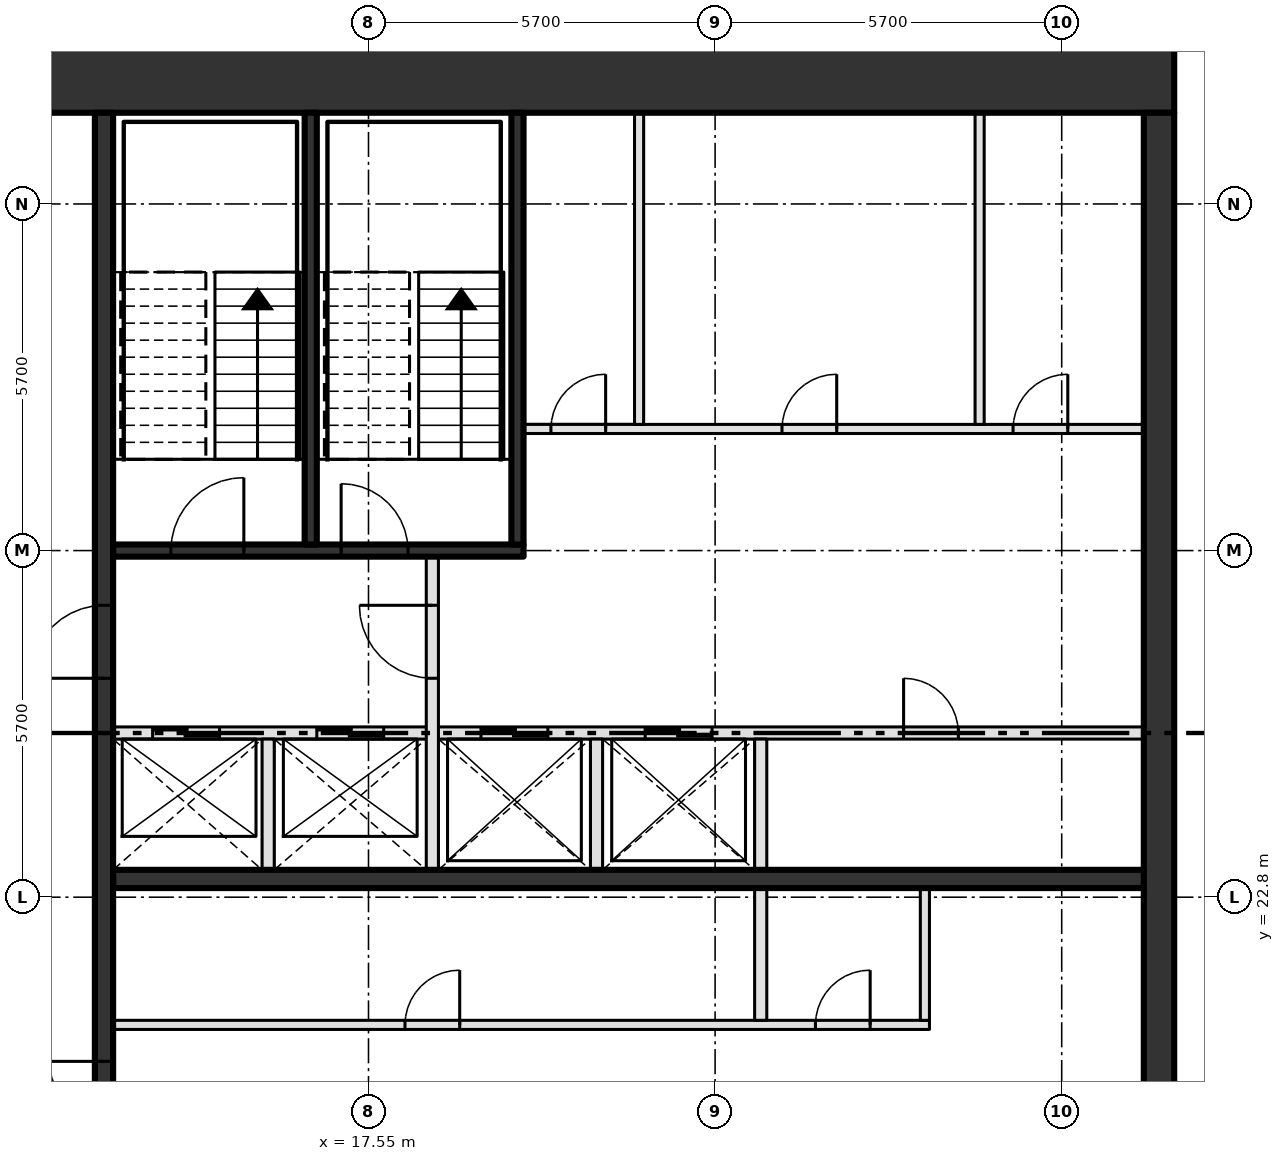
"""IFC4 building model, lengths in metres.
Left out: names, types, materials, properties, quantities, classifications, styles, units other than length and angle.
Written with IfcOpenShell. Run it as: python <this file> out.ifc"""

import sys

from ifc_helpers import new_model, si_unit, direction, frame, frame_2d, origin, place, context, subcontext, project, spatial, rectangle, extrude, element, fill, save


model = new_model("IFC4")
c1 = context("Model", 3, precision=1e-05, world=origin(), true_north=direction((0.0, 1.0)))
c2 = subcontext(c1, "Body", "Model", "MODEL_VIEW")
j1 = project(units=[si_unit("LENGTHUNIT", "METRE"), si_unit("PLANEANGLEUNIT", "RADIAN")], contexts=[c1])
p1 = place(None, origin())
s1 = spatial("IfcSite", under=j1, at=p1, CompositionType="ELEMENT")
p2 = place(p1, origin())
s2 = spatial("IfcBuilding", under=s1, at=p2, CompositionType="ELEMENT")
p3 = place(p2, frame((0.0, 0.0, 383.4)))
s3 = spatial("IfcBuildingStorey", under=s2, at=p3, CompositionType="ELEMENT", Elevation=383.4)
p4 = place(p3, frame((8.0, 36.3, -0.3), z_axis=(0.0, 0.0, 1.0), x_axis=(1.0, 0.0, 0.0)))
e1 = element("IfcWall", 1, at=p4, inside=s3, PredefinedType="SHEAR", context=c2, shape_type="SweptSolid", body=[
    extrude(rectangle(XDim=22.8, YDim=1.2, at=frame_2d((11.4, 0.0))), origin(), (0.0, 0.0, 1.0), 4.2),
])
p5 = place(p4, frame((2.3, 0.0, 0.3)))
e2 = element("IfcOpeningElement", 2, at=p5, cuts=e1, PredefinedType="OPENING", context=c2, shape_type="SweptSolid", body=[
    extrude(rectangle(XDim=1.8, YDim=2.1, at=frame_2d((0.9, 1.05))), frame((0.0, 0.61, 0.0), z_axis=(0.0, -1.0, 0.0), x_axis=(1.0, 0.0, 0.0)), (0.0, 0.0, 1.0), 1.22),
])
p6 = place(p3, frame((30.55, 14.6, -0.3), z_axis=(0.0, 0.0, 1.0), x_axis=(0.0, 1.0, 0.0)))
e3 = element("IfcWall", 3, at=p6, inside=s3, PredefinedType="SHEAR", context=c2, shape_type="SweptSolid", body=[
    extrude(rectangle(XDim=21.1, YDim=0.5, at=frame_2d((10.55, 0.0))), origin(), (0.0, 0.0, 1.0), 4.2),
])
p7 = place(p3, frame((13.35, 20.7, 0.0), z_axis=(0.0, 0.0, 1.0), x_axis=(1.0, 0.0, 0.0)))
e4 = element("IfcWall", 4, at=p7, inside=s3, PredefinedType="PARTITIONING", context=c2, shape_type="SweptSolid", body=[
    extrude(rectangle(XDim=13.425, YDim=0.15, at=frame_2d((6.712, 0.0))), origin(), (0.0, 0.0, 1.0), 3.9),
])
p8 = place(p7, frame((4.8, 0.0, 0.0)))
e5 = element("IfcOpeningElement", 5, at=p8, cuts=e4, PredefinedType="OPENING", context=c2, shape_type="SweptSolid", body=[
    extrude(rectangle(XDim=0.9, YDim=2.1, at=frame_2d((0.45, 1.05))), frame((0.0, 0.085, 0.0), z_axis=(0.0, -1.0, 0.0), x_axis=(1.0, 0.0, 0.0)), (0.0, 0.0, 1.0), 0.17),
])
p9 = place(p7, frame((11.55, 0.0, 0.0)))
e6 = element("IfcOpeningElement", 6, at=p9, cuts=e4, PredefinedType="OPENING", context=c2, shape_type="SweptSolid", body=[
    extrude(rectangle(XDim=0.9, YDim=2.1, at=frame_2d((0.45, 1.05))), frame((0.0, 0.085, 0.0), z_axis=(0.0, -1.0, 0.0), x_axis=(1.0, 0.0, 0.0)), (0.0, 0.0, 1.0), 0.17),
])
p10 = place(p3, frame((13.35, 23.1, 0.0), z_axis=(0.0, 0.0, 1.0), x_axis=(1.0, 0.0, 0.0)))
e7 = element("IfcWall", 7, at=p10, inside=s3, PredefinedType="SHEAR", context=c2, shape_type="SweptSolid", body=[
    extrude(rectangle(XDim=16.95, YDim=0.3, at=frame_2d((8.475, 0.0))), origin(), (0.0, 0.0, 1.0), 3.9),
])
p11 = place(p3, frame((13.35, 25.5, 0.0), z_axis=(0.0, 0.0, 1.0), x_axis=(1.0, 0.0, 0.0)))
e8 = element("IfcWall", 8, at=p11, inside=s3, PredefinedType="SOLIDWALL", context=c2, shape_type="SweptSolid", body=[
    extrude(rectangle(XDim=16.95, YDim=0.2, at=frame_2d((8.475, 0.0))), origin(), (0.0, 0.0, 1.0), 3.9),
])
p12 = place(p11, frame((0.65, 0.0, 0.0)))
e9 = element("IfcOpeningElement", 9, at=p12, cuts=e8, PredefinedType="OPENING", context=c2, shape_type="SweptSolid", body=[
    extrude(rectangle(XDim=1.1, YDim=2.1, at=frame_2d((0.55, 1.05))), frame((0.0, 0.11, 0.0), z_axis=(0.0, -1.0, 0.0), x_axis=(1.0, 0.0, 0.0)), (0.0, 0.0, 1.0), 0.22),
])
p13 = place(p11, frame((3.35, 0.0, 0.0)))
e10 = element("IfcOpeningElement", 10, at=p13, cuts=e8, PredefinedType="OPENING", context=c2, shape_type="SweptSolid", body=[
    extrude(rectangle(XDim=1.1, YDim=2.1, at=frame_2d((0.55, 1.05))), frame((0.0, 0.11, 0.0), z_axis=(0.0, -1.0, 0.0), x_axis=(1.0, 0.0, 0.0)), (0.0, 0.0, 1.0), 0.22),
])
p14 = place(p11, frame((6.05, 0.0, 0.0)))
e11 = element("IfcOpeningElement", 11, at=p14, cuts=e8, PredefinedType="OPENING", context=c2, shape_type="SweptSolid", body=[
    extrude(rectangle(XDim=1.1, YDim=2.1, at=frame_2d((0.55, 1.05))), frame((0.0, 0.11, 0.0), z_axis=(0.0, -1.0, 0.0), x_axis=(1.0, 0.0, 0.0)), (0.0, 0.0, 1.0), 0.22),
])
p15 = place(p11, frame((8.75, 0.0, 0.0)))
e12 = element("IfcOpeningElement", 12, at=p15, cuts=e8, PredefinedType="OPENING", context=c2, shape_type="SweptSolid", body=[
    extrude(rectangle(XDim=1.1, YDim=2.1, at=frame_2d((0.55, 1.05))), frame((0.0, 0.11, 0.0), z_axis=(0.0, -1.0, 0.0), x_axis=(1.0, 0.0, 0.0)), (0.0, 0.0, 1.0), 0.22),
])
p16 = place(p11, frame((13.0, 0.0, 0.0)))
e13 = element("IfcOpeningElement", 13, at=p16, cuts=e8, PredefinedType="OPENING", context=c2, shape_type="SweptSolid", body=[
    extrude(rectangle(XDim=0.9, YDim=2.1, at=frame_2d((0.45, 1.05))), frame((0.0, 0.11, 0.0), z_axis=(0.0, -1.0, 0.0), x_axis=(1.0, 0.0, 0.0)), (0.0, 0.0, 1.0), 0.22),
])
p17 = place(p3, frame((13.35, 28.5, 0.0), z_axis=(0.0, 0.0, 1.0), x_axis=(1.0, 0.0, 0.0)))
e14 = element("IfcWall", 14, at=p17, inside=s3, PredefinedType="SOLIDWALL", context=c2, shape_type="SweptSolid", body=[
    extrude(rectangle(XDim=6.75, YDim=0.2, at=frame_2d((3.375, 0.0))), origin(), (0.0, 0.0, 1.0), 3.9),
])
p18 = place(p17, frame((0.95, 0.0, 0.0)))
e15 = element("IfcOpeningElement", 15, at=p18, cuts=e14, PredefinedType="OPENING", context=c2, shape_type="SweptSolid", body=[
    extrude(rectangle(XDim=1.2, YDim=2.1, at=frame_2d((0.6, 1.05))), frame((0.0, 0.11, 0.0), z_axis=(0.0, -1.0, 0.0), x_axis=(1.0, 0.0, 0.0)), (0.0, 0.0, 1.0), 0.22),
])
p19 = place(p17, frame((3.75, 0.0, 0.0)))
e16 = element("IfcOpeningElement", 16, at=p19, cuts=e14, PredefinedType="OPENING", context=c2, shape_type="SweptSolid", body=[
    extrude(rectangle(XDim=1.1, YDim=2.1, at=frame_2d((0.55, 1.05))), frame((0.0, 0.11, 0.0), z_axis=(0.0, -1.0, 0.0), x_axis=(1.0, 0.0, 0.0)), (0.0, 0.0, 1.0), 0.22),
])
p20 = place(p3, frame((20.1, 30.5, 0.0), z_axis=(0.0, 0.0, 1.0), x_axis=(1.0, 0.0, 0.0)))
e17 = element("IfcWall", 17, at=p20, inside=s3, PredefinedType="PARTITIONING", context=c2, shape_type="SweptSolid", body=[
    extrude(rectangle(XDim=10.2, YDim=0.15, at=frame_2d((5.1, 0.0))), origin(), (0.0, 0.0, 1.0), 3.9),
])
p21 = place(p20, frame((0.45, 0.0, 0.0)))
e18 = element("IfcOpeningElement", 18, at=p21, cuts=e17, PredefinedType="OPENING", context=c2, shape_type="SweptSolid", body=[
    extrude(rectangle(XDim=0.9, YDim=2.1, at=frame_2d((0.45, 1.05))), frame((0.0, 0.085, 0.0), z_axis=(0.0, -1.0, 0.0), x_axis=(1.0, 0.0, 0.0)), (0.0, 0.0, 1.0), 0.17),
])
p22 = place(p20, frame((4.25, 0.0, 0.0)))
e19 = element("IfcOpeningElement", 19, at=p22, cuts=e17, PredefinedType="OPENING", context=c2, shape_type="SweptSolid", body=[
    extrude(rectangle(XDim=0.9, YDim=2.1, at=frame_2d((0.45, 1.05))), frame((0.0, 0.085, 0.0), z_axis=(0.0, -1.0, 0.0), x_axis=(1.0, 0.0, 0.0)), (0.0, 0.0, 1.0), 0.17),
])
p23 = place(p20, frame((8.05, 0.0, 0.0)))
e20 = element("IfcOpeningElement", 20, at=p23, cuts=e17, PredefinedType="OPENING", context=c2, shape_type="SweptSolid", body=[
    extrude(rectangle(XDim=0.9, YDim=2.1, at=frame_2d((0.45, 1.05))), frame((0.0, 0.085, 0.0), z_axis=(0.0, -1.0, 0.0), x_axis=(1.0, 0.0, 0.0)), (0.0, 0.0, 1.0), 0.17),
])
p24 = place(p3, frame((13.2, 14.6, 0.0), z_axis=(0.0, 0.0, 1.0), x_axis=(0.0, 1.0, 0.0)))
e21 = element("IfcWall", 21, at=p24, inside=s3, PredefinedType="SHEAR", context=c2, shape_type="SweptSolid", body=[
    extrude(rectangle(XDim=21.1, YDim=0.3, at=frame_2d((10.55, 0.0))), origin(), (0.0, 0.0, 1.0), 3.9),
])
p25 = place(p24, frame((3.7, 0.0, 0.0)))
e22 = element("IfcOpeningElement", 22, at=p25, cuts=e21, PredefinedType="OPENING", context=c2, shape_type="SweptSolid", body=[
    extrude(rectangle(XDim=1.8, YDim=2.1, at=frame_2d((0.9, 1.05))), frame((0.0, 0.16, 0.0), z_axis=(0.0, -1.0, 0.0), x_axis=(1.0, 0.0, 0.0)), (0.0, 0.0, 1.0), 0.32),
])
p26 = place(p24, frame((11.8, 0.0, 0.0)))
e23 = element("IfcOpeningElement", 23, at=p26, cuts=e21, PredefinedType="OPENING", context=c2, shape_type="SweptSolid", body=[
    extrude(rectangle(XDim=1.2, YDim=2.1, at=frame_2d((0.6, 1.05))), frame((0.0, 0.16, 0.0), z_axis=(0.0, -1.0, 0.0), x_axis=(1.0, 0.0, 0.0)), (0.0, 0.0, 1.0), 0.32),
])
p27 = place(p3, frame((15.9, 23.25, 0.0), z_axis=(0.0, 0.0, 1.0), x_axis=(0.0, 1.0, 0.0)))
e24 = element("IfcWall", 24, at=p27, inside=s3, PredefinedType="SOLIDWALL", context=c2, shape_type="SweptSolid", body=[
    extrude(rectangle(XDim=2.15, YDim=0.2, at=frame_2d((1.075, 0.0))), origin(), (0.0, 0.0, 1.0), 3.9),
])
p28 = place(p3, frame((16.6, 28.6, 0.0), z_axis=(0.0, 0.0, 1.0), x_axis=(0.0, 1.0, 0.0)))
e25 = element("IfcWall", 25, at=p28, inside=s3, PredefinedType="SOLIDWALL", context=c2, shape_type="SweptSolid", body=[
    extrude(rectangle(XDim=7.1, YDim=0.2, at=frame_2d((3.55, 0.0))), origin(), (0.0, 0.0, 1.0), 3.9),
])
p29 = place(p3, frame((18.6, 23.25, 0.0), z_axis=(0.0, 0.0, 1.0), x_axis=(0.0, 1.0, 0.0)))
e26 = element("IfcWall", 26, at=p29, inside=s3, PredefinedType="SOLIDWALL", context=c2, shape_type="SweptSolid", body=[
    extrude(rectangle(XDim=5.15, YDim=0.2, at=frame_2d((2.575, 0.0))), origin(), (0.0, 0.0, 1.0), 3.9),
])
p30 = place(p29, frame((3.15, 0.0, 0.0)))
e27 = element("IfcOpeningElement", 27, at=p30, cuts=e26, PredefinedType="OPENING", context=c2, shape_type="SweptSolid", body=[
    extrude(rectangle(XDim=1.2, YDim=2.1, at=frame_2d((0.6, 1.05))), frame((0.0, 0.11, 0.0), z_axis=(0.0, -1.0, 0.0), x_axis=(1.0, 0.0, 0.0)), (0.0, 0.0, 1.0), 0.22),
])
p31 = place(p3, frame((20.0, 28.6, 0.0), z_axis=(0.0, 0.0, 1.0), x_axis=(0.0, 1.0, 0.0)))
e28 = element("IfcWall", 28, at=p31, inside=s3, PredefinedType="SOLIDWALL", context=c2, shape_type="SweptSolid", body=[
    extrude(rectangle(XDim=7.1, YDim=0.2, at=frame_2d((3.55, 0.0))), origin(), (0.0, 0.0, 1.0), 3.9),
])
p32 = place(p3, frame((21.3, 23.25, 0.0), z_axis=(0.0, 0.0, 1.0), x_axis=(0.0, 1.0, 0.0)))
e29 = element("IfcWall", 29, at=p32, inside=s3, PredefinedType="SOLIDWALL", context=c2, shape_type="SweptSolid", body=[
    extrude(rectangle(XDim=2.15, YDim=0.2, at=frame_2d((1.075, 0.0))), origin(), (0.0, 0.0, 1.0), 3.9),
])
p33 = place(p3, frame((22.0, 30.575, 0.0), z_axis=(0.0, 0.0, 1.0), x_axis=(0.0, 1.0, 0.0)))
e30 = element("IfcWall", 30, at=p33, inside=s3, PredefinedType="PARTITIONING", context=c2, shape_type="SweptSolid", body=[
    extrude(rectangle(XDim=5.125, YDim=0.15, at=frame_2d((2.562, 0.0))), origin(), (0.0, 0.0, 1.0), 3.9),
])
p34 = place(p3, frame((24.0, 20.775, 0.0), z_axis=(0.0, 0.0, 1.0), x_axis=(0.0, 1.0, 0.0)))
e31 = element("IfcWall", 31, at=p34, inside=s3, PredefinedType="SOLIDWALL", context=c2, shape_type="SweptSolid", body=[
    extrude(rectangle(XDim=4.625, YDim=0.2, at=frame_2d((2.312, 0.0))), origin(), (0.0, 0.0, 1.0), 3.9),
])
p35 = place(p3, frame((26.7, 20.775, 0.0), z_axis=(0.0, 0.0, 1.0), x_axis=(0.0, 1.0, 0.0)))
e32 = element("IfcWall", 32, at=p35, inside=s3, PredefinedType="PARTITIONING", context=c2, shape_type="SweptSolid", body=[
    extrude(rectangle(XDim=2.175, YDim=0.15, at=frame_2d((1.087, 0.0))), origin(), (0.0, 0.0, 1.0), 3.9),
])
p36 = place(p3, frame((27.6, 30.575, 0.0), z_axis=(0.0, 0.0, 1.0), x_axis=(0.0, 1.0, 0.0)))
e33 = element("IfcWall", 33, at=p36, inside=s3, PredefinedType="PARTITIONING", context=c2, shape_type="SweptSolid", body=[
    extrude(rectangle(XDim=5.125, YDim=0.15, at=frame_2d((2.562, 0.0))), origin(), (0.0, 0.0, 1.0), 3.9),
])
p37 = place(p12, origin())
e34 = element("IfcDoor", 34, at=p37, inside=s3, OperationType="SLIDING_TO_LEFT", PredefinedType="DOOR", context=c2, shape_type="SweptSolid", body=[
    extrude(rectangle(XDim=1.1, YDim=2.1, at=frame_2d((0.55, 1.05))), frame((0.0, 0.025, 0.0), z_axis=(0.0, -1.0, 0.0), x_axis=(1.0, 0.0, 0.0)), (0.0, 0.0, 1.0), 0.05),
])
fill(e9, e34)
p38 = place(p13, origin())
e35 = element("IfcDoor", 35, at=p38, inside=s3, OperationType="SLIDING_TO_LEFT", PredefinedType="DOOR", context=c2, shape_type="SweptSolid", body=[
    extrude(rectangle(XDim=1.1, YDim=2.1, at=frame_2d((0.55, 1.05))), frame((0.0, 0.025, 0.0), z_axis=(0.0, -1.0, 0.0), x_axis=(1.0, 0.0, 0.0)), (0.0, 0.0, 1.0), 0.05),
])
fill(e10, e35)
p39 = place(p14, origin())
e36 = element("IfcDoor", 36, at=p39, inside=s3, OperationType="SLIDING_TO_LEFT", PredefinedType="DOOR", context=c2, shape_type="SweptSolid", body=[
    extrude(rectangle(XDim=1.1, YDim=2.1, at=frame_2d((0.55, 1.05))), frame((0.0, 0.025, 0.0), z_axis=(0.0, -1.0, 0.0), x_axis=(1.0, 0.0, 0.0)), (0.0, 0.0, 1.0), 0.05),
])
fill(e11, e36)
p40 = place(p15, origin())
e37 = element("IfcDoor", 37, at=p40, inside=s3, OperationType="SLIDING_TO_LEFT", PredefinedType="DOOR", context=c2, shape_type="SweptSolid", body=[
    extrude(rectangle(XDim=1.1, YDim=2.1, at=frame_2d((0.55, 1.05))), frame((0.0, 0.025, 0.0), z_axis=(0.0, -1.0, 0.0), x_axis=(1.0, 0.0, 0.0)), (0.0, 0.0, 1.0), 0.05),
])
fill(e12, e37)
p41 = place(p8, origin())
e38 = element("IfcDoor", 38, at=p41, inside=s3, OperationType="SINGLE_SWING_RIGHT", PredefinedType="DOOR", context=c2, shape_type="SweptSolid", body=[
    extrude(rectangle(XDim=0.9, YDim=2.1, at=frame_2d((0.45, 1.05))), frame((0.0, 0.025, 0.0), z_axis=(0.0, -1.0, 0.0), x_axis=(1.0, 0.0, 0.0)), (0.0, 0.0, 1.0), 0.05),
])
fill(e5, e38)
p42 = place(p9, origin())
e39 = element("IfcDoor", 39, at=p42, inside=s3, OperationType="SINGLE_SWING_RIGHT", PredefinedType="DOOR", context=c2, shape_type="SweptSolid", body=[
    extrude(rectangle(XDim=0.9, YDim=2.1, at=frame_2d((0.45, 1.05))), frame((0.0, 0.025, 0.0), z_axis=(0.0, -1.0, 0.0), x_axis=(1.0, 0.0, 0.0)), (0.0, 0.0, 1.0), 0.05),
])
fill(e6, e39)
p43 = place(p16, origin())
e40 = element("IfcDoor", 40, at=p43, inside=s3, OperationType="SINGLE_SWING_LEFT", PredefinedType="DOOR", context=c2, shape_type="SweptSolid", body=[
    extrude(rectangle(XDim=0.9, YDim=2.1, at=frame_2d((0.45, 1.05))), frame((0.0, 0.025, 0.0), z_axis=(0.0, -1.0, 0.0), x_axis=(1.0, 0.0, 0.0)), (0.0, 0.0, 1.0), 0.05),
])
fill(e13, e40)
p44 = place(p21, origin())
e41 = element("IfcDoor", 41, at=p44, inside=s3, OperationType="SINGLE_SWING_RIGHT", PredefinedType="DOOR", context=c2, shape_type="SweptSolid", body=[
    extrude(rectangle(XDim=0.9, YDim=2.1, at=frame_2d((0.45, 1.05))), frame((0.0, 0.025, 0.0), z_axis=(0.0, -1.0, 0.0), x_axis=(1.0, 0.0, 0.0)), (0.0, 0.0, 1.0), 0.05),
])
fill(e18, e41)
p45 = place(p22, origin())
e42 = element("IfcDoor", 42, at=p45, inside=s3, OperationType="SINGLE_SWING_RIGHT", PredefinedType="DOOR", context=c2, shape_type="SweptSolid", body=[
    extrude(rectangle(XDim=0.9, YDim=2.1, at=frame_2d((0.45, 1.05))), frame((0.0, 0.025, 0.0), z_axis=(0.0, -1.0, 0.0), x_axis=(1.0, 0.0, 0.0)), (0.0, 0.0, 1.0), 0.05),
])
fill(e19, e42)
p46 = place(p23, origin())
e43 = element("IfcDoor", 43, at=p46, inside=s3, OperationType="SINGLE_SWING_RIGHT", PredefinedType="DOOR", context=c2, shape_type="SweptSolid", body=[
    extrude(rectangle(XDim=0.9, YDim=2.1, at=frame_2d((0.45, 1.05))), frame((0.0, 0.025, 0.0), z_axis=(0.0, -1.0, 0.0), x_axis=(1.0, 0.0, 0.0)), (0.0, 0.0, 1.0), 0.05),
])
fill(e20, e43)
p47 = place(p18, origin())
e44 = element("IfcDoor", 44, at=p47, inside=s3, OperationType="SINGLE_SWING_RIGHT", PredefinedType="DOOR", context=c2, shape_type="SweptSolid", body=[
    extrude(rectangle(XDim=1.2, YDim=2.1, at=frame_2d((0.6, 1.05))), frame((0.0, 0.025, 0.0), z_axis=(0.0, -1.0, 0.0), x_axis=(1.0, 0.0, 0.0)), (0.0, 0.0, 1.0), 0.05),
])
fill(e15, e44)
p48 = place(p19, origin())
e45 = element("IfcDoor", 45, at=p48, inside=s3, OperationType="SINGLE_SWING_LEFT", PredefinedType="DOOR", context=c2, shape_type="SweptSolid", body=[
    extrude(rectangle(XDim=1.1, YDim=2.1, at=frame_2d((0.55, 1.05))), frame((0.0, 0.025, 0.0), z_axis=(0.0, -1.0, 0.0), x_axis=(1.0, 0.0, 0.0)), (0.0, 0.0, 1.0), 0.05),
])
fill(e16, e45)
p49 = place(p25, origin())
e46 = element("IfcDoor", 46, at=p49, inside=s3, OperationType="DOUBLE_DOOR_SINGLE_SWING", PredefinedType="DOOR", context=c2, shape_type="SweptSolid", body=[
    extrude(rectangle(XDim=1.8, YDim=2.1, at=frame_2d((0.9, 1.05))), frame((0.0, 0.025, 0.0), z_axis=(0.0, -1.0, 0.0), x_axis=(1.0, 0.0, 0.0)), (0.0, 0.0, 1.0), 0.05),
])
fill(e22, e46)
p50 = place(p26, origin())
e47 = element("IfcDoor", 47, at=p50, inside=s3, OperationType="SINGLE_SWING_LEFT", PredefinedType="DOOR", context=c2, shape_type="SweptSolid", body=[
    extrude(rectangle(XDim=1.2, YDim=2.1, at=frame_2d((0.6, 1.05))), frame((0.0, 0.025, 0.0), z_axis=(0.0, -1.0, 0.0), x_axis=(1.0, 0.0, 0.0)), (0.0, 0.0, 1.0), 0.05),
])
fill(e23, e47)
p51 = place(p30, origin())
e48 = element("IfcDoor", 48, at=p51, inside=s3, OperationType="SINGLE_SWING_RIGHT", PredefinedType="DOOR", context=c2, shape_type="SweptSolid", body=[
    extrude(rectangle(XDim=1.2, YDim=2.1, at=frame_2d((0.6, 1.05))), frame((0.0, 0.025, 0.0), z_axis=(0.0, -1.0, 0.0), x_axis=(1.0, 0.0, 0.0)), (0.0, 0.0, 1.0), 0.05),
])
fill(e27, e48)
save(model, sys.argv[1])
